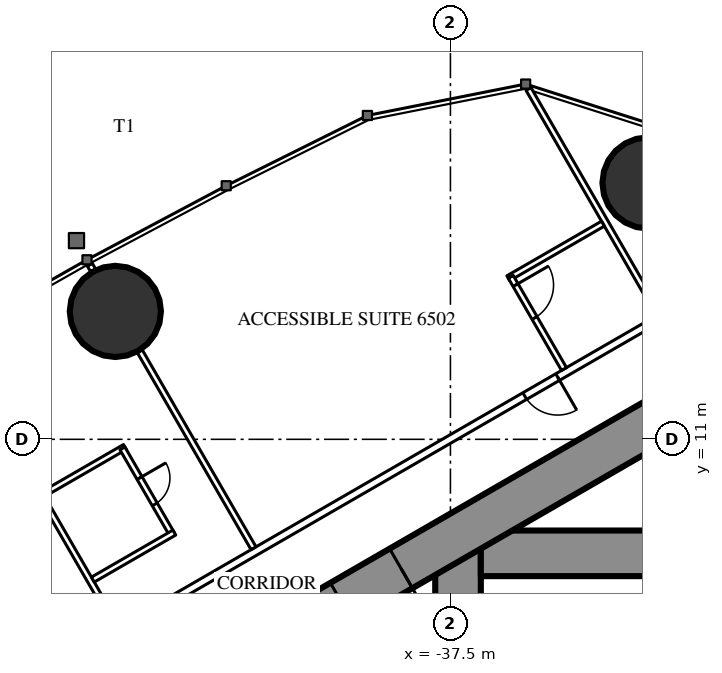
"""IFC4 building model, lengths in metres.
Left out: names, types, materials, properties, quantities, classifications, styles, units other than length and angle.
Written with IfcOpenShell. Run it as: python <this file> out.ifc"""

import sys

from ifc_helpers import new_model, si_unit, direction, frame, frame_2d, origin, origin_2d, place, context, subcontext, project, spatial, rectangle, circle, extrude, element, fill, save


model = new_model("IFC4")
c1 = context("Model", 3, precision=1e-05, world=origin(), true_north=direction((0.0, 1.0)))
c2 = subcontext(c1, "Body", "Model", "MODEL_VIEW")
j1 = project(units=[si_unit("LENGTHUNIT", "METRE"), si_unit("PLANEANGLEUNIT", "RADIAN")], contexts=[c1])
p1 = place(None, origin())
s1 = spatial("IfcSite", under=j1, at=p1, CompositionType="ELEMENT")
p2 = place(p1, origin())
s2 = spatial("IfcBuilding", under=s1, at=p2, CompositionType="ELEMENT")
p3 = place(p2, frame((0.0, 0.0, 244.1)))
s3 = spatial("IfcBuildingStorey", under=s2, at=p3, CompositionType="ELEMENT", Elevation=244.1)
for number, where, z_axis, x_axis in (
    (1, (-32.301, 17.745, 0.0), (0.0, 0.0, 1.0), (1.0, 0.0, 0.0)),
    (2, (-46.317, 14.365, 0.0), (0.0, 0.0, 1.0), (1.0, 0.0, 0.0)),
):
    element("IfcColumn", number, at=place(p3, frame(where, z_axis=z_axis, x_axis=x_axis)), inside=s3, PredefinedType="COLUMN", context=c2, shape_type="SweptSolid", body=[
        extrude(circle(Radius=1.2, at=origin_2d()), origin(), (0.0, 0.0, 1.0), 3.6),
    ])
p4 = place(p3, frame((-37.3, 8.6, 0.0), z_axis=(0.0, 0.0, 1.0), x_axis=(0.0, -1.0, 0.0)))
e3 = element("IfcWall", 3, at=p4, inside=s3, PredefinedType="SHEAR", context=c2, shape_type="SweptSolid", body=[
    extrude(rectangle(XDim=17.2, YDim=1.2, at=frame_2d((8.6, 0.0))), origin(), (0.0, 0.0, 1.0), 3.6),
])
p5 = place(p4, frame((7.7, 0.0, 0.0)))
e4 = element("IfcOpeningElement", 4, at=p5, cuts=e3, PredefinedType="OPENING", context=c2, shape_type="SweptSolid", body=[
    extrude(rectangle(XDim=1.8, YDim=2.2, at=frame_2d((0.9, 1.1))), frame((0.0, 0.61, 0.0), z_axis=(0.0, -1.0, 0.0), x_axis=(1.0, 0.0, 0.0)), (0.0, 0.0, 1.0), 1.22),
])
p6 = place(p3, frame((-28.3, 8.0, 0.0), z_axis=(0.0, 0.0, 1.0), x_axis=(-1.0, 0.0, 0.0)))
e5 = element("IfcWall", 5, at=p6, inside=s3, PredefinedType="SHEAR", context=c2, shape_type="SweptSolid", body=[
    extrude(rectangle(XDim=8.4, YDim=1.2, at=frame_2d((4.2, 0.0))), origin(), (0.0, 0.0, 1.0), 3.6),
])
p7 = place(p6, frame((0.25, 0.0, 0.0)))
e6 = element("IfcOpeningElement", 6, at=p7, cuts=e5, PredefinedType="OPENING", context=c2, shape_type="SweptSolid", body=[
    extrude(rectangle(XDim=1.0, YDim=2.2, at=frame_2d((0.5, 1.1))), frame((0.0, 0.61, 0.0), z_axis=(0.0, -1.0, 0.0), x_axis=(1.0, 0.0, 0.0)), (0.0, 0.0, 1.0), 1.22),
])
p8 = place(p3, frame((-27.2, 14.3, 0.0), z_axis=(0.0, 0.0, 1.0), x_axis=(-0.866026593062, -0.499997940104, 0.0)))
e7 = element("IfcWall", 7, at=p8, inside=s3, PredefinedType="SHEAR", context=c2, shape_type="SweptSolid", body=[
    extrude(rectangle(XDim=28.946, YDim=1.2, at=frame_2d((14.473, 0.0))), origin(), (0.0, 0.0, 1.0), 3.6),
])
p9 = place(p8, frame((4.6, 0.0, 0.0)))
e8 = element("IfcOpeningElement", 8, at=p9, cuts=e7, PredefinedType="OPENING", context=c2, shape_type="SweptSolid", body=[
    extrude(rectangle(XDim=1.0, YDim=2.2, at=frame_2d((0.5, 1.1))), frame((0.0, 0.61, 0.0), z_axis=(0.0, -1.0, 0.0), x_axis=(1.0, 0.0, 0.0)), (0.0, 0.0, 1.0), 1.22),
])
p10 = place(p8, frame((13.395, 0.0, 0.0)))
e9 = element("IfcOpeningElement", 9, at=p10, cuts=e7, PredefinedType="OPENING", context=c2, shape_type="SweptSolid", body=[
    extrude(rectangle(XDim=1.8, YDim=2.2, at=frame_2d((0.9, 1.1))), frame((0.0, 0.61, 0.0), z_axis=(0.0, -1.0, 0.0), x_axis=(1.0, 0.0, 0.0)), (0.0, 0.0, 1.0), 1.22),
])
p11 = place(p3, frame((-28.737, 16.068, 0.0), z_axis=(0.0, 0.0, 1.0), x_axis=(-0.866026057212, -0.499998868229, 0.0)))
e10 = element("IfcWall", 10, at=p11, inside=s3, PredefinedType="PARTITIONING", context=c2, shape_type="SweptSolid", body=[
    extrude(rectangle(XDim=32.137, YDim=0.2, at=frame_2d((16.068, 0.0))), origin(), (0.0, 0.0, 1.0), 3.35),
])
p12 = place(p11, frame((1.08, 0.0, 0.0)))
e11 = element("IfcOpeningElement", 11, at=p12, cuts=e10, PredefinedType="OPENING", context=c2, shape_type="SweptSolid", body=[
    extrude(rectangle(XDim=1.8, YDim=2.04, at=frame_2d((0.9, 1.02))), frame((0.0, 0.11, 0.0), z_axis=(0.0, -1.0, 0.0), x_axis=(1.0, 0.0, 0.0)), (0.0, 0.0, 1.0), 0.22),
])
p13 = place(p11, frame((6.86, 0.0, 0.0)))
e12 = element("IfcOpeningElement", 12, at=p13, cuts=e10, PredefinedType="OPENING", context=c2, shape_type="SweptSolid", body=[
    extrude(rectangle(XDim=1.0, YDim=2.2, at=frame_2d((0.5, 1.1))), frame((0.0, 0.11, 0.0), z_axis=(0.0, -1.0, 0.0), x_axis=(1.0, 0.0, 0.0)), (0.0, 0.0, 1.0), 0.22),
])
p14 = place(p11, frame((18.867, 0.0, 0.0)))
e13 = element("IfcOpeningElement", 13, at=p14, cuts=e10, PredefinedType="OPENING", context=c2, shape_type="SweptSolid", body=[
    extrude(rectangle(XDim=0.95, YDim=2.2, at=frame_2d((0.475, 1.1))), frame((0.0, 0.11, 0.0), z_axis=(0.0, -1.0, 0.0), x_axis=(1.0, 0.0, 0.0)), (0.0, 0.0, 1.0), 0.22),
])
p15 = place(p11, frame((23.015, 0.0, 0.0)))
e14 = element("IfcOpeningElement", 14, at=p15, cuts=e10, PredefinedType="OPENING", context=c2, shape_type="SweptSolid", body=[
    extrude(rectangle(XDim=0.95, YDim=2.2, at=frame_2d((0.475, 1.1))), frame((0.0, 0.11, 0.0), z_axis=(0.0, -1.0, 0.0), x_axis=(1.0, 0.0, 0.0)), (0.0, 0.0, 1.0), 0.22),
])
p16 = place(p11, frame((27.226, 0.0, 0.0)))
e15 = element("IfcOpeningElement", 15, at=p16, cuts=e10, PredefinedType="OPENING", context=c2, shape_type="SweptSolid", body=[
    extrude(rectangle(XDim=1.8, YDim=2.2, at=frame_2d((0.9, 1.1))), frame((0.0, 0.11, 0.0), z_axis=(0.0, -1.0, 0.0), x_axis=(1.0, 0.0, 0.0)), (0.0, 0.0, 1.0), 0.22),
])
p17 = place(p3, frame((-32.022, 14.287, 0.0), z_axis=(0.0, 0.0, 1.0), x_axis=(-0.50000019414, 0.866025291697, 0.0)))
e16 = element("IfcWall", 16, at=p17, inside=s3, PredefinedType="PARTITIONING", context=c2, shape_type="SweptSolid", body=[
    extrude(rectangle(XDim=6.848, YDim=0.15, at=frame_2d((3.424, 0.0))), origin(), (0.0, 0.0, 1.0), 3.35),
])
p18 = place(p3, frame((-42.68, 8.134, 0.0), z_axis=(0.0, 0.0, 1.0), x_axis=(-0.499984479505, 0.866034364361, 0.0)))
e17 = element("IfcWall", 17, at=p18, inside=s3, PredefinedType="PARTITIONING", context=c2, shape_type="SweptSolid", body=[
    extrude(rectangle(XDim=5.995, YDim=0.15, at=frame_2d((2.998, 0.0))), origin(), (0.0, 0.0, 1.0), 2.45),
])
p19 = place(p3, frame((-46.898, 15.439, 0.0), z_axis=(0.0, 0.0, 1.0), x_axis=(-0.500232303069, 0.865891241997, 0.0)))
e18 = element("IfcWall", 18, at=p19, inside=s3, PredefinedType="PARTITIONING", context=c2, shape_type="SweptSolid", body=[
    extrude(rectangle(XDim=0.18, YDim=0.15, at=frame_2d((0.09, 0.0))), origin(), (0.0, 0.0, 1.0), 2.45),
])
p20 = place(p3, frame((-46.274, 6.059, 0.0), z_axis=(0.0, 0.0, 1.0), x_axis=(-0.500020471368, 0.866013584312, 0.0)))
e19 = element("IfcWall", 19, at=p20, inside=s3, PredefinedType="PARTITIONING", context=c2, shape_type="SweptSolid", body=[
    extrude(rectangle(XDim=6.028, YDim=0.15, at=frame_2d((3.014, 0.0))), origin(), (0.0, 0.0, 1.0), 2.45),
])
p21 = place(p3, frame((-33.487, 16.675, 0.0), z_axis=(0.0, 0.0, 1.0), x_axis=(-0.866039941686, -0.499974818771, 0.0)))
e20 = element("IfcWall", 20, at=p21, inside=s3, PredefinedType="PARTITIONING", context=c2, shape_type="SweptSolid", body=[
    extrude(rectangle(XDim=2.875, YDim=0.15, at=frame_2d((1.438, 0.0))), origin(), (0.0, 0.0, 1.0), 3.35),
])
p22 = place(p3, frame((-34.511, 12.85, 0.0), z_axis=(0.0, 0.0, 1.0), x_axis=(-0.500011755427, 0.866018616679, 0.0)))
e21 = element("IfcWall", 21, at=p22, inside=s3, PredefinedType="PARTITIONING", context=c2, shape_type="SweptSolid", body=[
    extrude(rectangle(XDim=2.8, YDim=0.15, at=frame_2d((1.4, 0.0))), origin(), (0.0, 0.0, 1.0), 3.35),
])
p23 = place(p22, frame((1.55, 0.0, 0.0)))
e22 = element("IfcOpeningElement", 22, at=p23, cuts=e21, PredefinedType="OPENING", context=c2, shape_type="SweptSolid", body=[
    extrude(rectangle(XDim=1.0, YDim=2.2, at=frame_2d((0.5, 1.1))), frame((0.0, 0.085, 0.0), z_axis=(0.0, -1.0, 0.0), x_axis=(1.0, 0.0, 0.0)), (0.0, 0.0, 1.0), 0.17),
])
p24 = place(p3, frame((-46.065, 10.798, 0.0), z_axis=(0.0, 0.0, 1.0), x_axis=(-0.866031185235, -0.4999899861, 0.0)))
e23 = element("IfcWall", 23, at=p24, inside=s3, PredefinedType="PARTITIONING", context=c2, shape_type="SweptSolid", body=[
    extrude(rectangle(XDim=2.475, YDim=0.15, at=frame_2d((1.238, 0.0))), origin(), (0.0, 0.0, 1.0), 3.35),
])
p25 = place(p3, frame((-44.83, 8.509, 0.0), z_axis=(0.0, 0.0, 1.0), x_axis=(-0.499936506574, 0.866062058628, 0.0)))
e24 = element("IfcWall", 24, at=p25, inside=s3, PredefinedType="PARTITIONING", context=c2, shape_type="SweptSolid", body=[
    extrude(rectangle(XDim=2.6, YDim=0.15, at=frame_2d((1.3, 0.0))), origin(), (0.0, 0.0, 1.0), 3.35),
])
p26 = place(p25, frame((0.9, 0.0, 0.0)))
e25 = element("IfcOpeningElement", 25, at=p26, cuts=e24, PredefinedType="OPENING", context=c2, shape_type="SweptSolid", body=[
    extrude(rectangle(XDim=0.8, YDim=2.2, at=frame_2d((0.4, 1.1))), frame((0.0, 0.085, 0.0), z_axis=(0.0, -1.0, 0.0), x_axis=(1.0, 0.0, 0.0)), (0.0, 0.0, 1.0), 0.17),
])
p27 = place(p3, frame((-44.765, 8.546, 0.0), z_axis=(0.0, 0.0, 1.0), x_axis=(-0.86604923931, -0.499958713387, 0.0)))
e26 = element("IfcWall", 26, at=p27, inside=s3, PredefinedType="PARTITIONING", context=c2, shape_type="SweptSolid", body=[
    extrude(rectangle(XDim=2.475, YDim=0.15, at=frame_2d((1.237, 0.0))), origin(), (0.0, 0.0, 1.0), 3.35),
])
p28 = place(p23, origin())
e27 = element("IfcDoor", 27, at=p28, inside=s3, OperationType="SINGLE_SWING_RIGHT", PredefinedType="DOOR", context=c2, shape_type="SweptSolid", body=[
    extrude(rectangle(XDim=1.0, YDim=2.2, at=frame_2d((0.5, 1.1))), frame((0.0, 0.025, 0.0), z_axis=(0.0, -1.0, 0.0), x_axis=(1.0, 0.0, 0.0)), (0.0, 0.0, 1.0), 0.05),
])
fill(e22, e27)
p29 = place(p13, origin())
e28 = element("IfcDoor", 28, at=p29, inside=s3, OperationType="SINGLE_SWING_LEFT", PredefinedType="DOOR", context=c2, shape_type="SweptSolid", body=[
    extrude(rectangle(XDim=1.0, YDim=2.2, at=frame_2d((0.5, 1.1))), frame((0.0, 0.025, 0.0), z_axis=(0.0, -1.0, 0.0), x_axis=(1.0, 0.0, 0.0)), (0.0, 0.0, 1.0), 0.05),
])
fill(e12, e28)
p30 = place(p26, origin())
e29 = element("IfcDoor", 29, at=p30, inside=s3, OperationType="SINGLE_SWING_RIGHT", PredefinedType="DOOR", context=c2, shape_type="SweptSolid", body=[
    extrude(rectangle(XDim=0.8, YDim=2.2, at=frame_2d((0.4, 1.1))), frame((0.0, 0.025, 0.0), z_axis=(0.0, -1.0, 0.0), x_axis=(1.0, 0.0, 0.0)), (0.0, 0.0, 1.0), 0.05),
])
fill(e25, e29)
p31 = place(p10, origin())
e30 = element("IfcDoor", 30, at=p31, inside=s3, OperationType="DOUBLE_DOOR_SINGLE_SWING", PredefinedType="DOOR", context=c2, shape_type="SweptSolid", body=[
    extrude(rectangle(XDim=1.8, YDim=2.2, at=frame_2d((0.9, 1.1))), frame((0.0, 0.025, 0.0), z_axis=(0.0, -1.0, 0.0), x_axis=(1.0, 0.0, 0.0)), (0.0, 0.0, 1.0), 0.05),
])
fill(e9, e30)
save(model, sys.argv[1])
